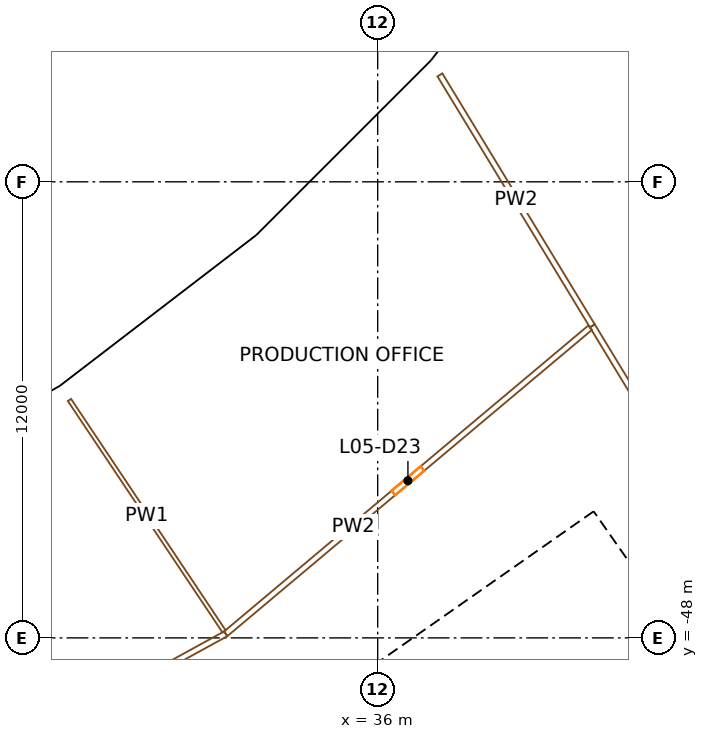
"""IFC4 building model, lengths in metres.
Left out: names, types, materials, properties, quantities, classifications, styles, units other than length and angle.
Written with IfcOpenShell. Run it as: python <this file> out.ifc"""

import sys

from ifc_helpers import new_model, si_unit, direction, frame, frame_2d, origin, origin_2d, place, context, subcontext, project, spatial, rectangle, extrude, element, fill, save


model = new_model("IFC4")
c1 = context("Model", 3, precision=1e-05, world=origin(), true_north=direction((0.0, 1.0)))
c2 = subcontext(c1, "Body", "Model", "MODEL_VIEW")
j1 = project(units=[si_unit("LENGTHUNIT", "METRE"), si_unit("PLANEANGLEUNIT", "RADIAN")], contexts=[c1])
p1 = place(None, origin())
s1 = spatial("IfcSite", under=j1, at=p1, CompositionType="ELEMENT")
p2 = place(p1, origin())
s2 = spatial("IfcBuilding", under=s1, at=p2, CompositionType="ELEMENT")
p3 = place(p2, frame((0.0, 0.0, 36.0)))
s3 = spatial("IfcBuildingStorey", under=s2, at=p3, CompositionType="ELEMENT", Elevation=36.0)
p4 = place(p3, frame((28.195, -42.197, 0.0), z_axis=(0.0, 0.0, 1.0), x_axis=(0.831469612303, 0.55557023302, 0.0)))
e1 = element("IfcColumn", 1, at=p4, inside=s3, PredefinedType="COLUMN", context=c2, shape_type="SweptSolid", body=[
    extrude(rectangle(XDim=1.1, YDim=1.3, at=origin_2d()), origin(), (0.0, 0.0, 1.0), 4.5),
])
p5 = place(p3, frame((32.362, -48.433, 0.0), z_axis=(0.0, 0.0, 1.0), x_axis=(0.831469612303, 0.55557023302, 0.0)))
e2 = element("IfcColumn", 2, at=p5, inside=s3, PredefinedType="COLUMN", context=c2, shape_type="SweptSolid", body=[
    extrude(rectangle(XDim=1.4, YDim=1.8, at=origin_2d()), origin(), (0.0, 0.0, 1.0), 4.5),
])
p6 = place(p3, frame((33.462, -38.156, 0.0), z_axis=(0.0, 0.0, 1.0), x_axis=(0.751839807479, 0.6593458151, 0.0)))
e3 = element("IfcColumn", 3, at=p6, inside=s3, PredefinedType="COLUMN", context=c2, shape_type="SweptSolid", body=[
    extrude(rectangle(XDim=1.1, YDim=1.3, at=origin_2d()), origin(), (0.0, 0.0, 1.0), 4.5),
])
p7 = place(p3, frame((38.407, -43.795, 0.0), z_axis=(0.0, 0.0, 1.0), x_axis=(0.751839807479, 0.6593458151, 0.0)))
e4 = element("IfcColumn", 4, at=p7, inside=s3, PredefinedType="COLUMN", context=c2, shape_type="SweptSolid", body=[
    extrude(rectangle(XDim=1.4, YDim=1.8, at=origin_2d()), origin(), (0.0, 0.0, 1.0), 4.5),
])
p8 = place(p3, frame((38.156, -33.462, 0.0), z_axis=(0.0, 0.0, 1.0), x_axis=(0.6593458151, 0.751839807479, 0.0)))
e5 = element("IfcColumn", 5, at=p8, inside=s3, PredefinedType="COLUMN", context=c2, shape_type="SweptSolid", body=[
    extrude(rectangle(XDim=1.1, YDim=1.3, at=origin_2d()), origin(), (0.0, 0.0, 1.0), 4.5),
])
p9 = place(p3, frame((49.779, -57.191, 0.0), z_axis=(0.0, 0.0, 1.0), x_axis=(-0.573577477574, 0.819151315216, 0.0)))
e6 = element("IfcWall", 6, at=p9, inside=s3, PredefinedType="SHEAR", context=c2, shape_type="SweptSolid", body=[
    extrude(rectangle(XDim=14.8, YDim=0.9, at=frame_2d((7.4, 0.0))), origin(), (0.0, 0.0, 1.0), 4.2),
])
p10 = place(p9, frame((6.7, 0.0, 0.0)))
e7 = element("IfcOpeningElement", 7, at=p10, cuts=e6, PredefinedType="OPENING", context=c2, shape_type="SweptSolid", body=[
    extrude(rectangle(XDim=1.4, YDim=2.1, at=frame_2d((0.7, 1.05))), frame((0.0, 0.46, 0.0), z_axis=(0.0, -1.0, 0.0), x_axis=(1.0, 0.0, 0.0)), (0.0, 0.0, 1.0), 0.92),
])
p11 = place(p3, frame((28.854, -54.324, 0.0), z_axis=(0.0, 0.0, 1.0), x_axis=(0.819145767589, 0.573585400304, 0.0)))
e8 = element("IfcWall", 8, at=p11, inside=s3, PredefinedType="SHEAR", context=c2, shape_type="SweptSolid", body=[
    extrude(rectangle(XDim=15.045, YDim=0.9, at=frame_2d((7.523, 0.0))), origin(), (0.0, 0.0, 1.0), 4.2),
])
p12 = place(p11, frame((1.05, 0.0, 0.0)))
e9 = element("IfcOpeningElement", 9, at=p12, cuts=e8, PredefinedType="OPENING", context=c2, shape_type="SweptSolid", body=[
    extrude(rectangle(XDim=0.9, YDim=2.1, at=frame_2d((0.45, 1.05))), frame((0.0, 0.46, 0.0), z_axis=(0.0, -1.0, 0.0), x_axis=(1.0, 0.0, 0.0)), (0.0, 0.0, 1.0), 0.92),
])
p13 = place(p11, frame((3.775, 0.0, 0.0)))
e10 = element("IfcOpeningElement", 10, at=p13, cuts=e8, PredefinedType="OPENING", context=c2, shape_type="SweptSolid", body=[
    extrude(rectangle(XDim=1.0, YDim=2.1, at=frame_2d((0.5, 1.05))), frame((0.0, 0.46, 0.0), z_axis=(0.0, -1.0, 0.0), x_axis=(1.0, 0.0, 0.0)), (0.0, 0.0, 1.0), 0.92),
])
p14 = place(p11, frame((6.275, 0.0, 0.0)))
e11 = element("IfcOpeningElement", 11, at=p14, cuts=e8, PredefinedType="OPENING", context=c2, shape_type="SweptSolid", body=[
    extrude(rectangle(XDim=1.0, YDim=2.1, at=frame_2d((0.5, 1.05))), frame((0.0, 0.46, 0.0), z_axis=(0.0, -1.0, 0.0), x_axis=(1.0, 0.0, 0.0)), (0.0, 0.0, 1.0), 0.92),
])
p15 = place(p11, frame((13.495, 0.0, 0.0)))
e12 = element("IfcOpeningElement", 12, at=p15, cuts=e8, PredefinedType="OPENING", context=c2, shape_type="SweptSolid", body=[
    extrude(rectangle(XDim=1.1, YDim=2.1, at=frame_2d((0.55, 1.05))), frame((0.0, 0.46, 0.0), z_axis=(0.0, -1.0, 0.0), x_axis=(1.0, 0.0, 0.0)), (0.0, 0.0, 1.0), 0.92),
])
p16 = place(p3, frame((27.714, -41.583, 0.0), z_axis=(0.0, 0.0, 1.0), x_axis=(-0.866022817921, -0.50000447882, 0.0)))
e13 = element("IfcWall", 13, at=p16, inside=s3, PredefinedType="SOLIDWALL", context=c2, shape_type="SweptSolid", body=[
    extrude(rectangle(XDim=6.419, YDim=0.45, at=frame_2d((3.21, 0.0))), origin(), (0.0, 0.0, 1.0), 3.2),
])
p17 = place(p16, frame((3.66, 0.0, 0.9)))
e14 = element("IfcOpeningElement", 14, at=p17, cuts=e13, PredefinedType="OPENING", context=c2, shape_type="SweptSolid", body=[
    extrude(rectangle(XDim=1.2, YDim=2.15, at=frame_2d((0.6, 1.075))), frame((0.0, 0.235, 0.0), z_axis=(0.0, -1.0, 0.0), x_axis=(1.0, 0.0, 0.0)), (0.0, 0.0, 1.0), 0.47),
])
p18 = place(p16, frame((1.56, 0.0, 0.9)))
e15 = element("IfcOpeningElement", 15, at=p18, cuts=e13, PredefinedType="OPENING", context=c2, shape_type="SweptSolid", body=[
    extrude(rectangle(XDim=1.2, YDim=2.15, at=frame_2d((0.6, 1.075))), frame((0.0, 0.235, 0.0), z_axis=(0.0, -1.0, 0.0), x_axis=(1.0, 0.0, 0.0)), (0.0, 0.0, 1.0), 0.47),
])
p19 = place(p3, frame((32.975, -37.555, 0.0), z_axis=(0.0, 0.0, 1.0), x_axis=(-0.793338838284, -0.608780327927, 0.0)))
e16 = element("IfcWall", 16, at=p19, inside=s3, PredefinedType="SOLIDWALL", context=c2, shape_type="SweptSolid", body=[
    extrude(rectangle(XDim=6.597, YDim=0.45, at=frame_2d((3.298, 0.0))), origin(), (0.0, 0.0, 1.0), 3.2),
])
p20 = place(p19, frame((3.749, 0.0, 0.9)))
e17 = element("IfcOpeningElement", 17, at=p20, cuts=e16, PredefinedType="OPENING", context=c2, shape_type="SweptSolid", body=[
    extrude(rectangle(XDim=1.2, YDim=2.15, at=frame_2d((0.6, 1.075))), frame((0.0, 0.235, 0.0), z_axis=(0.0, -1.0, 0.0), x_axis=(1.0, 0.0, 0.0)), (0.0, 0.0, 1.0), 0.47),
])
p21 = place(p19, frame((1.648, 0.0, 0.9)))
e18 = element("IfcOpeningElement", 18, at=p21, cuts=e16, PredefinedType="OPENING", context=c2, shape_type="SweptSolid", body=[
    extrude(rectangle(XDim=1.2, YDim=2.15, at=frame_2d((0.6, 1.075))), frame((0.0, 0.235, 0.0), z_axis=(0.0, -1.0, 0.0), x_axis=(1.0, 0.0, 0.0)), (0.0, 0.0, 1.0), 0.47),
])
p22 = place(p3, frame((37.532, -32.993, 0.0), z_axis=(0.0, 0.0, 1.0), x_axis=(-0.707106781187, -0.707106781187, 0.0)))
e19 = element("IfcWall", 19, at=p22, inside=s3, PredefinedType="SOLIDWALL", context=c2, shape_type="SweptSolid", body=[
    extrude(rectangle(XDim=6.419, YDim=0.45, at=frame_2d((3.209, 0.0))), origin(), (0.0, 0.0, 1.0), 3.2),
])
p23 = place(p22, frame((3.66, 0.0, 0.9)))
e20 = element("IfcOpeningElement", 20, at=p23, cuts=e19, PredefinedType="OPENING", context=c2, shape_type="SweptSolid", body=[
    extrude(rectangle(XDim=1.2, YDim=2.15, at=frame_2d((0.6, 1.075))), frame((0.0, 0.235, 0.0), z_axis=(0.0, -1.0, 0.0), x_axis=(1.0, 0.0, 0.0)), (0.0, 0.0, 1.0), 0.47),
])
p24 = place(p22, frame((1.56, 0.0, 0.9)))
e21 = element("IfcOpeningElement", 21, at=p24, cuts=e19, PredefinedType="OPENING", context=c2, shape_type="SweptSolid", body=[
    extrude(rectangle(XDim=1.2, YDim=2.15, at=frame_2d((0.6, 1.075))), frame((0.0, 0.235, 0.0), z_axis=(0.0, -1.0, 0.0), x_axis=(1.0, 0.0, 0.0)), (0.0, 0.0, 1.0), 0.47),
])
p25 = place(p3, frame((41.571, -27.741, 0.0), z_axis=(0.0, 0.0, 1.0), x_axis=(-0.608780327927, -0.793338838284, 0.0)))
e22 = element("IfcWall", 22, at=p25, inside=s3, PredefinedType="SOLIDWALL", context=c2, shape_type="SweptSolid", body=[
    extrude(rectangle(XDim=6.597, YDim=0.45, at=frame_2d((3.298, 0.0))), origin(), (0.0, 0.0, 1.0), 3.2),
])
p26 = place(p25, frame((3.749, 0.0, 0.9)))
e23 = element("IfcOpeningElement", 23, at=p26, cuts=e22, PredefinedType="OPENING", context=c2, shape_type="SweptSolid", body=[
    extrude(rectangle(XDim=1.2, YDim=2.15, at=frame_2d((0.6, 1.075))), frame((0.0, 0.235, 0.0), z_axis=(0.0, -1.0, 0.0), x_axis=(1.0, 0.0, 0.0)), (0.0, 0.0, 1.0), 0.47),
])
p27 = place(p25, frame((1.648, 0.0, 0.9)))
e24 = element("IfcOpeningElement", 24, at=p27, cuts=e22, PredefinedType="OPENING", context=c2, shape_type="SweptSolid", body=[
    extrude(rectangle(XDim=1.2, YDim=2.15, at=frame_2d((0.6, 1.075))), frame((0.0, 0.235, 0.0), z_axis=(0.0, -1.0, 0.0), x_axis=(1.0, 0.0, 0.0)), (0.0, 0.0, 1.0), 0.47),
])
p28 = place(p3, frame((23.24, -52.697, 0.0), z_axis=(0.0, 0.0, 1.0), x_axis=(0.876826033283, 0.480807765492, 0.0)))
e25 = element("IfcWall", 25, at=p28, inside=s3, PredefinedType="PARTITIONING", context=c2, shape_type="SweptSolid", body=[
    extrude(rectangle(XDim=9.991, YDim=0.15, at=frame_2d((4.996, 0.0))), origin(), (0.0, 0.0, 1.0), 3.1),
])
p29 = place(p28, frame((4.496, 0.0, 0.0)))
e26 = element("IfcOpeningElement", 26, at=p29, cuts=e25, PredefinedType="OPENING", context=c2, shape_type="SweptSolid", body=[
    extrude(rectangle(XDim=1.0, YDim=2.1, at=frame_2d((0.5, 1.05))), frame((0.0, 0.085, 0.0), z_axis=(0.0, -1.0, 0.0), x_axis=(1.0, 0.0, 0.0)), (0.0, 0.0, 1.0), 0.17),
])
p30 = place(p3, frame((27.89, -41.74, 0.0), z_axis=(0.0, 0.0, 1.0), x_axis=(0.555569023768, -0.831470420297, 0.0)))
e27 = element("IfcWall", 27, at=p30, inside=s3, PredefinedType="PARTITIONING", context=c2, shape_type="SweptSolid", body=[
    extrude(rectangle(XDim=7.325, YDim=0.1, at=frame_2d((3.663, 0.0))), origin(), (0.0, 0.0, 1.0), 3.1),
])
p31 = place(p3, frame((32.001, -47.893, 0.0), z_axis=(0.0, 0.0, 1.0), x_axis=(0.765734049768, 0.643157340801, 0.0)))
e28 = element("IfcWall", 28, at=p31, inside=s3, PredefinedType="PARTITIONING", context=c2, shape_type="SweptSolid", body=[
    extrude(rectangle(XDim=12.524, YDim=0.15, at=frame_2d((6.262, 0.0))), origin(), (0.0, 0.0, 1.0), 3.1),
])
p32 = place(p31, frame((5.762, 0.0, 0.0)))
e29 = element("IfcOpeningElement", 29, at=p32, cuts=e28, PredefinedType="OPENING", context=c2, shape_type="SweptSolid", body=[
    extrude(rectangle(XDim=1.0, YDim=2.1, at=frame_2d((0.5, 1.05))), frame((0.0, 0.085, 0.0), z_axis=(0.0, -1.0, 0.0), x_axis=(1.0, 0.0, 0.0)), (0.0, 0.0, 1.0), 0.17),
])
p33 = place(p3, frame((37.638, -33.187, 0.0), z_axis=(0.0, 0.0, 1.0), x_axis=(0.519163683086, -0.854674833, 0.0)))
e30 = element("IfcWall", 30, at=p33, inside=s3, PredefinedType="PARTITIONING", context=c2, shape_type="SweptSolid", body=[
    extrude(rectangle(XDim=7.725, YDim=0.15, at=frame_2d((3.862, 0.0))), origin(), (0.0, 0.0, 1.0), 3.1),
])
p34 = place(p3, frame((41.648, -39.789, 0.0), z_axis=(0.0, 0.0, 1.0), x_axis=(0.519144162426, -0.854686690325, 0.0)))
e31 = element("IfcWall", 31, at=p34, inside=s3, PredefinedType="PARTITIONING", context=c2, shape_type="SweptSolid", body=[
    extrude(rectangle(XDim=9.554, YDim=0.15, at=frame_2d((4.777, 0.0))), origin(), (0.0, 0.0, 1.0), 3.1),
])
p35 = place(p3, frame((55.542, -37.112, 0.0), z_axis=(0.0, 0.0, 1.0), x_axis=(-0.831472868546, 0.555565359677, 0.0)))
e32 = element("IfcWall", 32, at=p35, inside=s3, PredefinedType="PARTITIONING", context=c2, shape_type="SweptSolid", body=[
    extrude(rectangle(XDim=16.6, YDim=0.1, at=frame_2d((8.3, 0.0))), origin(), (0.0, 0.0, 1.0), 3.1),
])
p36 = place(p15, origin())
e33 = element("IfcDoor", 33, at=p36, inside=s3, OperationType="SINGLE_SWING_RIGHT", PredefinedType="DOOR", context=c2, shape_type="SweptSolid", body=[
    extrude(rectangle(XDim=1.1, YDim=2.1, at=frame_2d((0.55, 1.05))), frame((0.0, 0.025, 0.0), z_axis=(0.0, -1.0, 0.0), x_axis=(1.0, 0.0, 0.0)), (0.0, 0.0, 1.0), 0.05),
])
fill(e12, e33)
p37 = place(p20, origin())
e34 = element("IfcWindow", 34, at=p37, inside=s3, PartitioningType="SINGLE_PANEL", PredefinedType="WINDOW", context=c2, shape_type="SweptSolid", body=[
    extrude(rectangle(XDim=1.2, YDim=2.15, at=frame_2d((0.6, 1.075))), frame((0.0, 0.03, 0.0), z_axis=(0.0, -1.0, 0.0), x_axis=(1.0, 0.0, 0.0)), (0.0, 0.0, 1.0), 0.06),
])
fill(e17, e34)
p38 = place(p21, origin())
e35 = element("IfcWindow", 35, at=p38, inside=s3, PartitioningType="SINGLE_PANEL", PredefinedType="WINDOW", context=c2, shape_type="SweptSolid", body=[
    extrude(rectangle(XDim=1.2, YDim=2.15, at=frame_2d((0.6, 1.075))), frame((0.0, 0.03, 0.0), z_axis=(0.0, -1.0, 0.0), x_axis=(1.0, 0.0, 0.0)), (0.0, 0.0, 1.0), 0.06),
])
fill(e18, e35)
p39 = place(p23, origin())
e36 = element("IfcWindow", 36, at=p39, inside=s3, PartitioningType="SINGLE_PANEL", PredefinedType="WINDOW", context=c2, shape_type="SweptSolid", body=[
    extrude(rectangle(XDim=1.2, YDim=2.15, at=frame_2d((0.6, 1.075))), frame((0.0, 0.03, 0.0), z_axis=(0.0, -1.0, 0.0), x_axis=(1.0, 0.0, 0.0)), (0.0, 0.0, 1.0), 0.06),
])
fill(e20, e36)
p40 = place(p24, origin())
e37 = element("IfcWindow", 37, at=p40, inside=s3, PartitioningType="SINGLE_PANEL", PredefinedType="WINDOW", context=c2, shape_type="SweptSolid", body=[
    extrude(rectangle(XDim=1.2, YDim=2.15, at=frame_2d((0.6, 1.075))), frame((0.0, 0.03, 0.0), z_axis=(0.0, -1.0, 0.0), x_axis=(1.0, 0.0, 0.0)), (0.0, 0.0, 1.0), 0.06),
])
fill(e21, e37)
p41 = place(p32, origin())
e38 = element("IfcDoor", 38, at=p41, inside=s3, OperationType="SINGLE_SWING_RIGHT", PredefinedType="DOOR", context=c2, shape_type="SweptSolid", body=[
    extrude(rectangle(XDim=1.0, YDim=2.1, at=frame_2d((0.5, 1.05))), frame((0.0, 0.025, 0.0), z_axis=(0.0, -1.0, 0.0), x_axis=(1.0, 0.0, 0.0)), (0.0, 0.0, 1.0), 0.05),
])
fill(e29, e38)
save(model, sys.argv[1])
